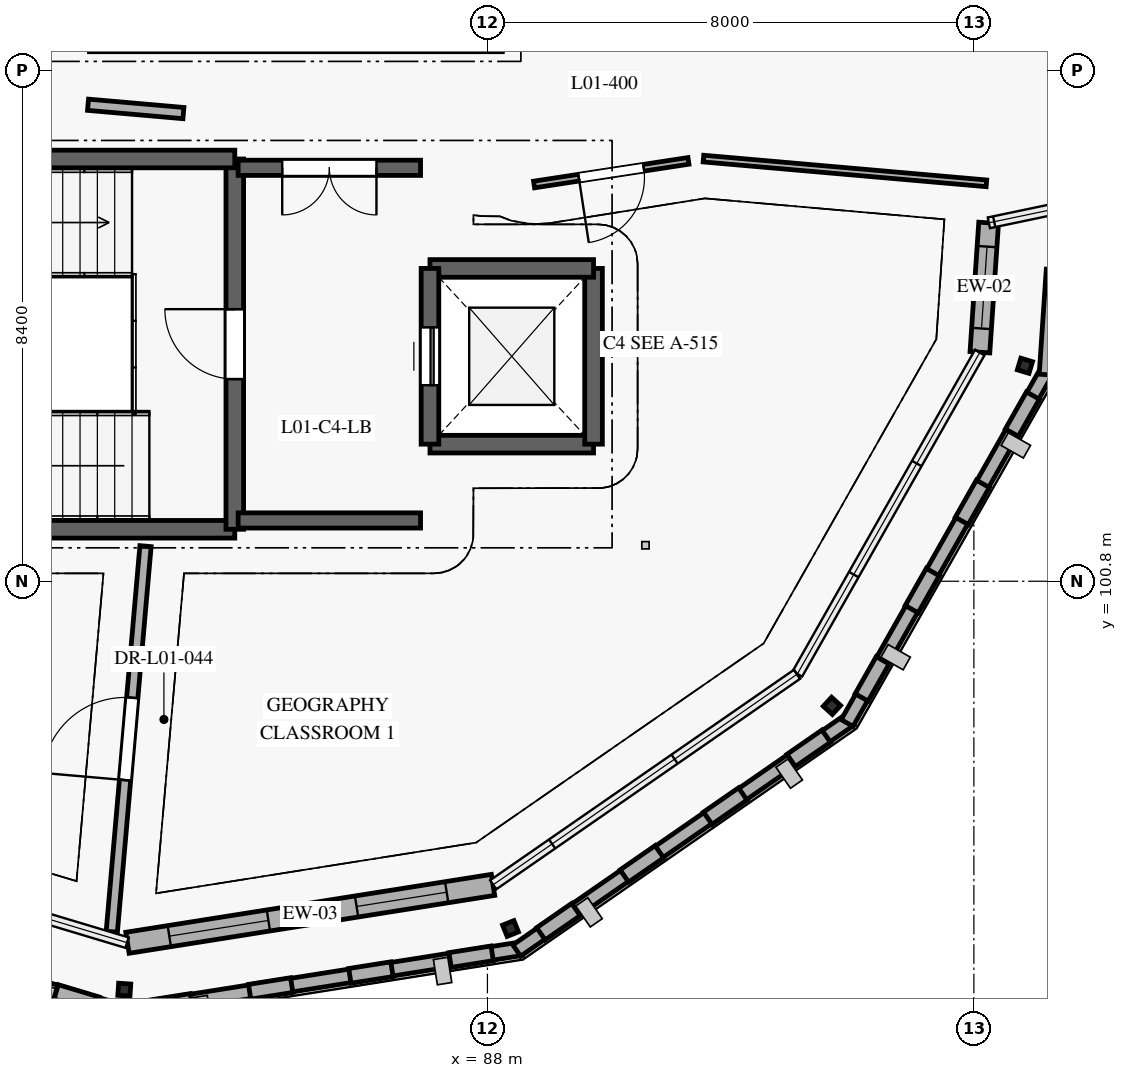
"""IFC4 building model, lengths in metres.
Left out: names, types, materials, properties, quantities, classifications, styles, units other than length and angle.
Written with IfcOpenShell. Run it as: python <this file> out.ifc"""

import sys

from ifc_helpers import new_model, si_unit, direction, frame, frame_2d, origin, origin_2d, place, context, subcontext, project, spatial, rectangle, hollow_rectangle, extrude, element, fill, save


model = new_model("IFC4")
c1 = context("Model", 3, precision=1e-05, world=origin(), true_north=direction((0.0, 1.0)))
c2 = subcontext(c1, "Body", "Model", "MODEL_VIEW")
j1 = project(units=[si_unit("LENGTHUNIT", "METRE"), si_unit("PLANEANGLEUNIT", "RADIAN")], contexts=[c1])
p1 = place(None, origin())
s1 = spatial("IfcSite", under=j1, at=p1, CompositionType="ELEMENT")
p2 = place(p1, origin())
s2 = spatial("IfcBuilding", under=s1, at=p2, CompositionType="ELEMENT")
p3 = place(p2, frame((0.0, 0.0, 4.2)))
s3 = spatial("IfcBuildingStorey", under=s2, at=p3, CompositionType="ELEMENT", Elevation=4.2)
for number, where, z_axis, x_axis in (
    (1, (82.028, 94.083, 0.0), (0.0, 0.0, 1.0), (0.998, -0.067, 0.0)),
    (2, (88.38, 95.089, 0.0), (0.0, 0.0, 1.0), (0.928, 0.372, 0.0)),
    (3, (93.666, 98.751, 0.0), (0.0, 0.0, 1.0), (0.675, 0.738, 0.0)),
    (4, (96.84, 104.344, 0.0), (0.0, 0.0, 1.0), (0.288, 0.958, 0.0)),
):
    element("IfcColumn", number, at=place(p3, frame(where, z_axis=z_axis, x_axis=x_axis)), inside=s3, PredefinedType="COLUMN", context=c2, shape_type="SweptSolid", body=[
        extrude(hollow_rectangle(XDim=0.2, YDim=0.2, WallThickness=0.012, InnerFilletRadius=0.012, OuterFilletRadius=0.019, at=origin_2d()), origin(), (0.0, 0.0, 1.0), 4.2),
    ])
p4 = place(p3, frame((96.243, 106.695, 0.0), z_axis=(0.0, 0.0, 1.0), x_axis=(-0.067309145793, -0.997732167915, 0.0)))
e5 = element("IfcWall", 5, at=p4, inside=s3, PredefinedType="SOLIDWALL", context=c2, shape_type="SweptSolid", body=[
    extrude(rectangle(XDim=2.133, YDim=0.325, at=frame_2d((1.066, 0.0))), origin(), (0.0, 0.0, 1.0), 3.94),
])
p5 = place(p4, frame((0.391, 0.0, 0.85)))
e6 = element("IfcOpeningElement", 6, at=p5, cuts=e5, PredefinedType="OPENING", context=c2, shape_type="SweptSolid", body=[
    extrude(rectangle(XDim=1.35, YDim=1.6, at=frame_2d((0.675, 0.8))), frame((0.0, 0.172, 0.0), z_axis=(0.0, -1.0, 0.0), x_axis=(1.0, 0.0, 0.0)), (0.0, 0.0, 1.0), 0.345),
])
p6 = place(p3, frame((88.092, 95.806, 0.0), z_axis=(0.0, 0.0, 1.0), x_axis=(-0.987690665759, -0.156419783824, 0.0)))
e7 = element("IfcWall", 7, at=p6, inside=s3, PredefinedType="SOLIDWALL", context=c2, shape_type="SweptSolid", body=[
    extrude(rectangle(XDim=6.087, YDim=0.35, at=frame_2d((3.043, 0.0))), origin(), (0.0, 0.0, 1.0), 3.94),
])
p7 = place(p6, frame((0.772, 0.0, 0.85)))
e8 = element("IfcOpeningElement", 8, at=p7, cuts=e7, PredefinedType="OPENING", context=c2, shape_type="SweptSolid", body=[
    extrude(rectangle(XDim=1.5, YDim=1.6, at=frame_2d((0.75, 0.8))), frame((0.0, 0.185, 0.0), z_axis=(0.0, -1.0, 0.0), x_axis=(1.0, 0.0, 0.0)), (0.0, 0.0, 1.0), 0.37),
])
p8 = place(p6, frame((3.74, 0.0, 0.85)))
e9 = element("IfcOpeningElement", 9, at=p8, cuts=e7, PredefinedType="OPENING", context=c2, shape_type="SweptSolid", body=[
    extrude(rectangle(XDim=1.65, YDim=1.6, at=frame_2d((0.825, 0.8))), frame((0.0, 0.185, 0.0), z_axis=(0.0, -1.0, 0.0), x_axis=(1.0, 0.0, 0.0)), (0.0, 0.0, 1.0), 0.37),
])
p9 = place(p3, frame((75.649, 95.626, 0.0), z_axis=(0.0, 0.0, 1.0), x_axis=(0.957749751871, -0.287602873404, 0.0)))
e10 = element("IfcWall", 10, at=p9, inside=s3, PredefinedType="ELEMENTEDWALL", context=c2, shape_type="SweptSolid", body=[
    extrude(rectangle(XDim=6.676, YDim=0.225, at=frame_2d((3.338, 0.0))), origin(), (0.0, 0.0, 1.0), 1.09),
])
p10 = place(p3, frame((80.908, 94.047, 1.09), z_axis=(0.0, 0.0, 1.0), x_axis=(0.957826285221, -0.287347885566, 0.0)))
e11 = element("IfcWall", 11, at=p10, inside=s3, PredefinedType="ELEMENTEDWALL", context=c2, shape_type="SweptSolid", body=[
    extrude(rectangle(XDim=0.701, YDim=0.245, at=frame_2d((0.351, 0.0))), origin(), (0.0, 0.0, 1.0), 2.85),
])
p11 = place(p3, frame((81.963, 93.712, 0.0), z_axis=(0.0, 0.0, 1.0), x_axis=(0.987690206406, 0.156422684322, 0.0)))
e12 = element("IfcWall", 12, at=p11, inside=s3, PredefinedType="ELEMENTEDWALL", context=c2, shape_type="SweptSolid", body=[
    extrude(rectangle(XDim=6.676, YDim=0.225, at=frame_2d((3.338, 0.0))), origin(), (0.0, 0.0, 1.0), 1.09),
])
for number, where, z_axis, x_axis in (
    (13, (82.441, 93.788, 1.09), (0.0, 0.0, 1.0), (0.988, 0.156, 0.0)),
    (14, (84.089, 94.049, 1.09), (0.0, 0.0, 1.0), (0.988, 0.156, 0.0)),
    (15, (85.738, 94.31, 1.09), (0.0, 0.0, 1.0), (0.988, 0.156, 0.0)),
    (16, (87.386, 94.571, 1.09), (0.0, 0.0, 1.0), (0.988, 0.156, 0.0)),
):
    element("IfcWall", number, at=place(p3, frame(where, z_axis=z_axis, x_axis=x_axis)), inside=s3, PredefinedType="ELEMENTEDWALL", context=c2, shape_type="SweptSolid", body=[
        extrude(rectangle(XDim=0.701, YDim=0.245, at=frame_2d((0.351, 0.0))), origin(), (0.0, 0.0, 1.0), 2.85),
    ])
p12 = place(p3, frame((88.482, 94.726, 0.0), z_axis=(0.0, 0.0, 1.0), x_axis=(0.822009139105, 0.56947429725, 0.0)))
e17 = element("IfcWall", 17, at=p12, inside=s3, PredefinedType="ELEMENTEDWALL", context=c2, shape_type="SweptSolid", body=[
    extrude(rectangle(XDim=6.676, YDim=0.225, at=frame_2d((3.338, 0.0))), origin(), (0.0, 0.0, 1.0), 1.09),
])
for number, where, z_axis, x_axis in (
    (18, (88.88, 95.002, 1.09), (0.0, 0.0, 1.0), (0.822, 0.569, 0.0)),
    (19, (90.252, 95.952, 1.09), (0.0, 0.0, 1.0), (0.822, 0.569, 0.0)),
):
    element("IfcWall", number, at=place(p3, frame(where, z_axis=z_axis, x_axis=x_axis)), inside=s3, PredefinedType="ELEMENTEDWALL", context=c2, shape_type="SweptSolid", body=[
        extrude(rectangle(XDim=0.701, YDim=0.245, at=frame_2d((0.351, 0.0))), origin(), (0.0, 0.0, 1.0), 2.85),
    ])
p13 = place(p3, frame((91.623, 96.903, 1.09), z_axis=(0.0, 0.0, 1.0), x_axis=(0.821953993254, 0.569553889438, 0.0)))
e20 = element("IfcWall", 20, at=p13, inside=s3, PredefinedType="ELEMENTEDWALL", context=c2, shape_type="SweptSolid", body=[
    extrude(rectangle(XDim=0.701, YDim=0.245, at=frame_2d((0.351, 0.0))), origin(), (0.0, 0.0, 1.0), 2.85),
])
p14 = place(p3, frame((92.995, 97.853, 1.09), z_axis=(0.0, 0.0, 1.0), x_axis=(0.822004061083, 0.569481627064, 0.0)))
e21 = element("IfcWall", 21, at=p14, inside=s3, PredefinedType="ELEMENTEDWALL", context=c2, shape_type="SweptSolid", body=[
    extrude(rectangle(XDim=0.701, YDim=0.245, at=frame_2d((0.351, 0.0))), origin(), (0.0, 0.0, 1.0), 2.85),
])
p15 = place(p3, frame((93.915, 98.469, 0.0), z_axis=(0.0, 0.0, 1.0), x_axis=(0.493497861667, 0.869747009498, 0.0)))
e22 = element("IfcWall", 22, at=p15, inside=s3, PredefinedType="ELEMENTEDWALL", context=c2, shape_type="SweptSolid", body=[
    extrude(rectangle(XDim=6.676, YDim=0.225, at=frame_2d((3.338, 0.0))), origin(), (0.0, 0.0, 1.0), 1.09),
])
for number, where, z_axis, x_axis in (
    (23, (94.154, 98.89, 1.09), (0.0, 0.0, 1.0), (0.494, 0.87, 0.0)),
    (24, (94.978, 100.341, 1.09), (0.0, 0.0, 1.0), (0.493, 0.87, 0.0)),
    (25, (95.801, 101.793, 1.09), (0.0, 0.0, 1.0), (0.494, 0.87, 0.0)),
):
    element("IfcWall", number, at=place(p3, frame(where, z_axis=z_axis, x_axis=x_axis)), inside=s3, PredefinedType="ELEMENTEDWALL", context=c2, shape_type="SweptSolid", body=[
        extrude(rectangle(XDim=0.701, YDim=0.245, at=frame_2d((0.351, 0.0))), origin(), (0.0, 0.0, 1.0), 2.85),
    ])
p16 = place(p3, frame((96.625, 103.244, 1.09), z_axis=(0.0, 0.0, 1.0), x_axis=(0.49339908657, 0.869803047461, 0.0)))
e26 = element("IfcWall", 26, at=p16, inside=s3, PredefinedType="ELEMENTEDWALL", context=c2, shape_type="SweptSolid", body=[
    extrude(rectangle(XDim=0.701, YDim=0.245, at=frame_2d((0.351, 0.0))), origin(), (0.0, 0.0, 1.0), 2.85),
])
p17 = place(p3, frame((97.187, 104.198, 0.0), z_axis=(0.0, 0.0, 1.0), x_axis=(0.067258320943, 0.997735595368, 0.0)))
e27 = element("IfcWall", 27, at=p17, inside=s3, PredefinedType="ELEMENTEDWALL", context=c2, shape_type="SweptSolid", body=[
    extrude(rectangle(XDim=1.731, YDim=0.225, at=frame_2d((0.866, 0.0))), origin(), (0.0, 0.0, 1.0), 1.09),
])
p18 = place(p3, frame((77.055, 101.655, 0.0), z_axis=(0.0, 0.0, 1.0), x_axis=(1.0, 0.0, 0.0)))
e28 = element("IfcWall", 28, at=p18, inside=s3, PredefinedType="SHEAR", context=c2, shape_type="SweptSolid", body=[
    extrude(rectangle(XDim=6.79, YDim=0.29, at=frame_2d((3.395, 0.0))), origin(), (0.0, 0.0, 1.0), 3.95),
])
p19 = place(p3, frame((83.845, 101.655, 0.0), z_axis=(0.0, 0.0, 1.0), x_axis=(0.0, 1.0, 0.0)))
e29 = element("IfcWall", 29, at=p19, inside=s3, PredefinedType="SHEAR", context=c2, shape_type="SweptSolid", body=[
    extrude(rectangle(XDim=6.09, YDim=0.29, at=frame_2d((3.045, 0.0))), origin(), (0.0, 0.0, 1.0), 3.95),
])
p20 = place(p19, frame((2.47, 0.0, 0.0)))
e30 = element("IfcOpeningElement", 30, at=p20, cuts=e29, PredefinedType="OPENING", context=c2, shape_type="SweptSolid", body=[
    extrude(rectangle(XDim=1.15, YDim=2.1, at=frame_2d((0.575, 1.05))), frame((0.0, 0.155, 0.0), z_axis=(0.0, -1.0, 0.0), x_axis=(1.0, 0.0, 0.0)), (0.0, 0.0, 1.0), 0.31),
])
p21 = place(p3, frame((83.845, 107.745, 0.0), z_axis=(0.0, 0.0, 1.0), x_axis=(-1.0, 0.0, 0.0)))
e31 = element("IfcWall", 31, at=p21, inside=s3, PredefinedType="SHEAR", context=c2, shape_type="SweptSolid", body=[
    extrude(rectangle(XDim=6.79, YDim=0.29, at=frame_2d((3.395, 0.0))), origin(), (0.0, 0.0, 1.0), 3.95),
])
p22 = place(p3, frame((87.055, 103.055, 0.0), z_axis=(0.0, 0.0, 1.0), x_axis=(1.0, 0.0, 0.0)))
e32 = element("IfcWall", 32, at=p22, inside=s3, PredefinedType="SHEAR", context=c2, shape_type="SweptSolid", body=[
    extrude(rectangle(XDim=2.69, YDim=0.29, at=frame_2d((1.345, 0.0))), origin(), (0.0, 0.0, 1.0), 3.95),
])
p23 = place(p3, frame((89.745, 103.055, 0.0), z_axis=(0.0, 0.0, 1.0), x_axis=(0.0, 1.0, 0.0)))
e33 = element("IfcWall", 33, at=p23, inside=s3, PredefinedType="SHEAR", context=c2, shape_type="SweptSolid", body=[
    extrude(rectangle(XDim=2.89, YDim=0.29, at=frame_2d((1.445, 0.0))), origin(), (0.0, 0.0, 1.0), 3.95),
])
p24 = place(p3, frame((89.745, 105.945, 0.0), z_axis=(0.0, 0.0, 1.0), x_axis=(-1.0, 0.0, 0.0)))
e34 = element("IfcWall", 34, at=p24, inside=s3, PredefinedType="SHEAR", context=c2, shape_type="SweptSolid", body=[
    extrude(rectangle(XDim=2.69, YDim=0.29, at=frame_2d((1.345, 0.0))), origin(), (0.0, 0.0, 1.0), 3.95),
])
p25 = place(p3, frame((87.055, 105.945, 0.0), z_axis=(0.0, 0.0, 1.0), x_axis=(0.0, -1.0, 0.0)))
e35 = element("IfcWall", 35, at=p25, inside=s3, PredefinedType="SHEAR", context=c2, shape_type="SweptSolid", body=[
    extrude(rectangle(XDim=2.89, YDim=0.29, at=frame_2d((1.445, 0.0))), origin(), (0.0, 0.0, 1.0), 3.95),
])
p26 = place(p25, frame((0.97, 0.0, 0.0)))
e36 = element("IfcOpeningElement", 36, at=p26, cuts=e35, PredefinedType="OPENING", context=c2, shape_type="SweptSolid", body=[
    extrude(rectangle(XDim=0.95, YDim=2.1, at=frame_2d((0.475, 1.05))), frame((0.0, 0.155, 0.0), z_axis=(0.0, -1.0, 0.0), x_axis=(1.0, 0.0, 0.0)), (0.0, 0.0, 1.0), 0.31),
])
p27 = place(p3, frame((83.9, 101.8, 0.0), z_axis=(0.0, 0.0, 1.0), x_axis=(1.0, 0.0, 0.0)))
e37 = element("IfcWall", 37, at=p27, inside=s3, PredefinedType="SHEAR", context=c2, shape_type="SweptSolid", body=[
    extrude(rectangle(XDim=3.0, YDim=0.25, at=frame_2d((1.5, 0.0))), origin(), (0.0, 0.0, 1.0), 3.95),
])
p28 = place(p3, frame((86.9, 107.6, 0.0), z_axis=(0.0, 0.0, 1.0), x_axis=(-1.0, 0.0, 0.0)))
e38 = element("IfcWall", 38, at=p28, inside=s3, PredefinedType="SHEAR", context=c2, shape_type="SweptSolid", body=[
    extrude(rectangle(XDim=3.0, YDim=0.25, at=frame_2d((1.5, 0.0))), origin(), (0.0, 0.0, 1.0), 3.95),
])
p29 = place(p28, frame((0.725, 0.0, 0.0)))
e39 = element("IfcOpeningElement", 39, at=p29, cuts=e38, PredefinedType="OPENING", context=c2, shape_type="SweptSolid", body=[
    extrude(rectangle(XDim=1.55, YDim=2.15, at=frame_2d((0.775, 1.075))), frame((0.0, 0.135, 0.0), z_axis=(0.0, -1.0, 0.0), x_axis=(1.0, 0.0, 0.0)), (0.0, 0.0, 1.0), 0.27),
])
p30 = place(p3, frame((81.431, 108.637, 0.0), z_axis=(0.0, 0.0, 1.0), x_axis=(0.996196241539, -0.08713809926, 0.0)))
e40 = element("IfcWall", 40, at=p30, inside=s3, PredefinedType="PARTITIONING", context=c2, shape_type="SweptSolid", body=[
    extrude(rectangle(XDim=1.575, YDim=0.185, at=frame_2d((0.787, 0.0))), origin(), (0.0, 0.0, 1.0), 3.93),
])
p31 = place(p3, frame((81.822, 95.036, 0.0), z_axis=(0.0, 0.0, 1.0), x_axis=(0.08717408664, 0.996193093039, 0.0)))
e41 = element("IfcWall", 41, at=p31, inside=s3, PredefinedType="PARTITIONING", context=c2, shape_type="SweptSolid", body=[
    extrude(rectangle(XDim=6.366, YDim=0.185, at=frame_2d((3.183, 0.0))), origin(), (0.0, 0.0, 1.0), 3.93),
])
p32 = place(p31, frame((2.503, 0.0, 0.0)))
e42 = element("IfcOpeningElement", 42, at=p32, cuts=e41, PredefinedType="OPENING", context=c2, shape_type="SweptSolid", body=[
    extrude(rectangle(XDim=1.36, YDim=2.14, at=frame_2d((0.68, 1.07))), frame((0.0, 0.103, 0.0), z_axis=(0.0, -1.0, 0.0), x_axis=(1.0, 0.0, 0.0)), (0.0, 0.0, 1.0), 0.205),
])
p33 = place(p3, frame((96.206, 107.344, 0.0), z_axis=(0.0, 0.0, 1.0), x_axis=(-0.996193377134, 0.087170840051, 0.0)))
e43 = element("IfcWall", 43, at=p33, inside=s3, PredefinedType="PARTITIONING", context=c2, shape_type="SweptSolid", body=[
    extrude(rectangle(XDim=4.672, YDim=0.11, at=frame_2d((2.336, 0.0))), origin(), (0.0, 0.0, 1.0), 3.93),
])
p34 = place(p3, frame((91.306, 107.714, 0.0), z_axis=(0.0, 0.0, 1.0), x_axis=(-0.988481340726, -0.151342786539, 0.0)))
e44 = element("IfcWall", 44, at=p34, inside=s3, PredefinedType="PARTITIONING", context=c2, shape_type="SweptSolid", body=[
    extrude(rectangle(XDim=2.568, YDim=0.11, at=frame_2d((1.284, 0.0))), origin(), (0.0, 0.0, 1.0), 3.93),
])
p35 = place(p34, frame((0.744, 0.0, 0.0)))
e45 = element("IfcOpeningElement", 45, at=p35, cuts=e44, PredefinedType="OPENING", context=c2, shape_type="SweptSolid", body=[
    extrude(rectangle(XDim=1.08, YDim=2.12, at=frame_2d((0.54, 1.06))), frame((0.0, 0.065, 0.0), z_axis=(0.0, -1.0, 0.0), x_axis=(1.0, 0.0, 0.0)), (0.0, 0.0, 1.0), 0.13),
])
p36 = place(p5, origin())
e46 = element("IfcWindow", 46, at=p36, inside=s3, PartitioningType="SINGLE_PANEL", PredefinedType="WINDOW", context=c2, shape_type="SweptSolid", body=[
    extrude(rectangle(XDim=1.35, YDim=1.6, at=frame_2d((0.675, 0.8))), frame((0.0, 0.03, 0.0), z_axis=(0.0, -1.0, 0.0), x_axis=(1.0, 0.0, 0.0)), (0.0, 0.0, 1.0), 0.06),
])
fill(e6, e46)
p37 = place(p7, origin())
e47 = element("IfcWindow", 47, at=p37, inside=s3, PartitioningType="SINGLE_PANEL", PredefinedType="WINDOW", context=c2, shape_type="SweptSolid", body=[
    extrude(rectangle(XDim=1.5, YDim=1.6, at=frame_2d((0.75, 0.8))), frame((0.0, 0.03, 0.0), z_axis=(0.0, -1.0, 0.0), x_axis=(1.0, 0.0, 0.0)), (0.0, 0.0, 1.0), 0.06),
])
fill(e8, e47)
p38 = place(p8, origin())
e48 = element("IfcWindow", 48, at=p38, inside=s3, PartitioningType="SINGLE_PANEL", PredefinedType="WINDOW", context=c2, shape_type="SweptSolid", body=[
    extrude(rectangle(XDim=1.65, YDim=1.6, at=frame_2d((0.825, 0.8))), frame((0.0, 0.03, 0.0), z_axis=(0.0, -1.0, 0.0), x_axis=(1.0, 0.0, 0.0)), (0.0, 0.0, 1.0), 0.06),
])
fill(e9, e48)
p39 = place(p20, origin())
e49 = element("IfcDoor", 49, at=p39, inside=s3, OperationType="SINGLE_SWING_RIGHT", PredefinedType="DOOR", context=c2, shape_type="SweptSolid", body=[
    extrude(rectangle(XDim=1.15, YDim=2.1, at=frame_2d((0.575, 1.05))), frame((0.0, 0.025, 0.0), z_axis=(0.0, -1.0, 0.0), x_axis=(1.0, 0.0, 0.0)), (0.0, 0.0, 1.0), 0.05),
])
fill(e30, e49)
p40 = place(p26, frame((0.95, 0.0, 0.0), z_axis=(0.0, 0.0, 1.0), x_axis=(-1.0, 0.0, 0.0)))
e50 = element("IfcDoor", 50, at=p40, inside=s3, OperationType="SLIDING_TO_LEFT", PredefinedType="DOOR", context=c2, shape_type="SweptSolid", body=[
    extrude(rectangle(XDim=0.95, YDim=2.1, at=frame_2d((0.475, 1.05))), frame((0.0, 0.025, 0.0), z_axis=(0.0, -1.0, 0.0), x_axis=(1.0, 0.0, 0.0)), (0.0, 0.0, 1.0), 0.05),
])
fill(e36, e50)
p41 = place(p29, origin())
e51 = element("IfcDoor", 51, at=p41, inside=s3, OperationType="DOUBLE_DOOR_SINGLE_SWING", PredefinedType="DOOR", context=c2, shape_type="SweptSolid", body=[
    extrude(rectangle(XDim=1.55, YDim=2.15, at=frame_2d((0.775, 1.075))), frame((0.0, 0.025, 0.0), z_axis=(0.0, -1.0, 0.0), x_axis=(1.0, 0.0, 0.0)), (0.0, 0.0, 1.0), 0.05),
])
fill(e39, e51)
p42 = place(p32, origin())
e52 = element("IfcDoor", 52, at=p42, inside=s3, OperationType="SINGLE_SWING_LEFT", PredefinedType="DOOR", context=c2, shape_type="SweptSolid", body=[
    extrude(rectangle(XDim=1.36, YDim=2.14, at=frame_2d((0.68, 1.07))), frame((0.0, 0.025, 0.0), z_axis=(0.0, -1.0, 0.0), x_axis=(1.0, 0.0, 0.0)), (0.0, 0.0, 1.0), 0.05),
])
fill(e42, e52)
p43 = place(p35, origin())
e53 = element("IfcDoor", 53, at=p43, inside=s3, OperationType="SINGLE_SWING_RIGHT", PredefinedType="DOOR", context=c2, shape_type="SweptSolid", body=[
    extrude(rectangle(XDim=1.08, YDim=2.12, at=frame_2d((0.54, 1.06))), frame((0.0, 0.025, 0.0), z_axis=(0.0, -1.0, 0.0), x_axis=(1.0, 0.0, 0.0)), (0.0, 0.0, 1.0), 0.05),
])
fill(e45, e53)
save(model, sys.argv[1])
